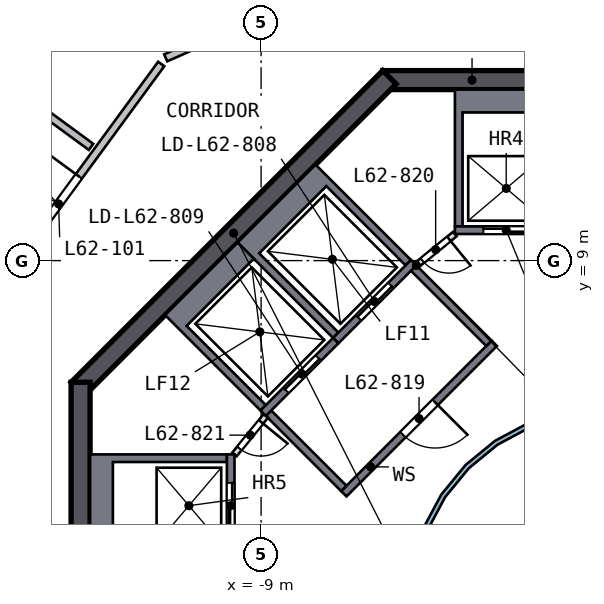
"""IFC4 building model, lengths in metres.
Left out: names, types, materials, properties, quantities, classifications, styles, units other than length and angle.
Written with IfcOpenShell. Run it as: python <this file> out.ifc"""

import sys

from ifc_helpers import new_model, si_unit, direction, frame, frame_2d, origin, place, context, subcontext, project, spatial, polyline, rectangle, outline, extrude, element, fill, save


model = new_model("IFC4")
c1 = context("Model", 3, precision=1e-05, world=origin(), true_north=direction((0.0, 1.0)))
c2 = subcontext(c1, "Body", "Model", "MODEL_VIEW")
j1 = project(units=[si_unit("LENGTHUNIT", "METRE"), si_unit("PLANEANGLEUNIT", "RADIAN")], contexts=[c1])
p1 = place(None, origin())
s1 = spatial("IfcSite", under=j1, at=p1, CompositionType="ELEMENT")
p2 = place(p1, origin())
s2 = spatial("IfcBuilding", under=s1, at=p2, CompositionType="ELEMENT")
p3 = place(p2, frame((0.0, 0.0, 252.5)))
s3 = spatial("IfcBuildingStorey", under=s2, at=p3, CompositionType="ELEMENT", Elevation=252.5)
p4 = place(p3, frame((5.799, 13.75, 0.0), z_axis=(0.0, 0.0, 1.0), x_axis=(-1.0, 0.0, 0.0)))
e1 = element("IfcWall", 1, at=p4, inside=s3, PredefinedType="SHEAR", context=c2, shape_type="SweptSolid", body=[
    extrude(rectangle(XDim=11.598, YDim=0.5, at=frame_2d((5.799, 0.0))), origin(), (0.0, 0.0, 1.0), 3.5),
])
p5 = place(p4, frame((4.899, 0.0, 0.0)))
e2 = element("IfcOpeningElement", 2, at=p5, cuts=e1, PredefinedType="OPENING", context=c2, shape_type="SweptSolid", body=[
    extrude(rectangle(XDim=1.8, YDim=2.1, at=frame_2d((0.9, 1.05))), frame((0.0, 0.26, 0.0), z_axis=(0.0, -1.0, 0.0), x_axis=(1.0, 0.0, 0.0)), (0.0, 0.0, 1.0), 0.52),
])
p6 = place(p3, frame((-5.622, 13.823, 0.0), z_axis=(0.0, 0.0, 1.0), x_axis=(-0.707106781, -0.707106781, 0.0)))
e3 = element("IfcWall", 3, at=p6, inside=s3, PredefinedType="SHEAR", context=c2, shape_type="SweptSolid", body=[
    extrude(rectangle(XDim=11.598, YDim=0.5, at=frame_2d((5.799, 0.0))), origin(), (0.0, 0.0, 1.0), 3.5),
])
p7 = place(p3, frame((-13.75, 5.799, 0.0), z_axis=(0.0, 0.0, 1.0), x_axis=(0.0, -1.0, 0.0)))
e4 = element("IfcWall", 4, at=p7, inside=s3, PredefinedType="SHEAR", context=c2, shape_type="SweptSolid", body=[
    extrude(rectangle(XDim=11.598, YDim=0.5, at=frame_2d((5.799, 0.0))), origin(), (0.0, 0.0, 1.0), 3.5),
])
p8 = place(p7, frame((4.899, 0.0, 0.0)))
e5 = element("IfcOpeningElement", 5, at=p8, cuts=e4, PredefinedType="OPENING", context=c2, shape_type="SweptSolid", body=[
    extrude(rectangle(XDim=1.8, YDim=2.1, at=frame_2d((0.9, 1.05))), frame((0.0, 0.26, 0.0), z_axis=(0.0, -1.0, 0.0), x_axis=(1.0, 0.0, 0.0)), (0.0, 0.0, 1.0), 0.52),
])
p9 = place(p3, origin())
e6 = element("IfcWall", 6, at=p9, inside=s3, PredefinedType="SOLIDWALL", context=c2, shape_type="SweptSolid", body=[
    extrude(outline(polyline([(-3.9, 13.5), (-1.2, 13.5), (-1.2, 9.9), (-1.4, 9.9), (-1.4, 12.9), (-3.7, 12.9), (-3.7, 9.9), (-3.9, 9.9), (-3.9, 13.5)])), origin(), (0.0, 0.0, 1.0), 3.19),
])
p10 = place(p3, frame((-1.2, 9.8, 0.0), z_axis=(0.0, 0.0, 1.0), x_axis=(-1.0, 0.0, 0.0)))
e7 = element("IfcWall", 7, at=p10, inside=s3, PredefinedType="SOLIDWALL", context=c2, shape_type="SweptSolid", body=[
    extrude(rectangle(XDim=2.7, YDim=0.2, at=frame_2d((1.35, 0.0))), origin(), (0.0, 0.0, 1.0), 3.19),
])
p11 = place(p10, frame((0.75, 0.0, 0.0)))
e8 = element("IfcOpeningElement", 8, at=p11, cuts=e7, PredefinedType="OPENING", context=c2, shape_type="SweptSolid", body=[
    extrude(rectangle(XDim=1.2, YDim=2.1, at=frame_2d((0.6, 1.05))), frame((0.0, 0.11, 0.0), z_axis=(0.0, -1.0, 0.0), x_axis=(1.0, 0.0, 0.0)), (0.0, 0.0, 1.0), 0.22),
])
p12 = place(p3, origin())
e9 = element("IfcWall", 9, at=p12, inside=s3, PredefinedType="SOLIDWALL", context=c2, shape_type="SweptSolid", body=[
    extrude(outline(polyline([(-13.5, 3.9), (-9.9, 3.9), (-9.9, 3.7), (-12.9, 3.7), (-12.9, 1.4), (-9.9, 1.4), (-9.9, 1.2), (-13.5, 1.2), (-13.5, 3.9)])), origin(), (0.0, 0.0, 1.0), 3.19),
])
p13 = place(p3, frame((-9.8, 1.2, 0.0), z_axis=(0.0, 0.0, 1.0), x_axis=(0.0, 1.0, 0.0)))
e10 = element("IfcWall", 10, at=p13, inside=s3, PredefinedType="SOLIDWALL", context=c2, shape_type="SweptSolid", body=[
    extrude(rectangle(XDim=2.7, YDim=0.2, at=frame_2d((1.35, 0.0))), origin(), (0.0, 0.0, 1.0), 3.19),
])
p14 = place(p13, frame((0.75, 0.0, 0.0)))
e11 = element("IfcOpeningElement", 11, at=p14, cuts=e10, PredefinedType="OPENING", context=c2, shape_type="SweptSolid", body=[
    extrude(rectangle(XDim=1.2, YDim=2.1, at=frame_2d((0.6, 1.05))), frame((0.0, 0.11, 0.0), z_axis=(0.0, -1.0, 0.0), x_axis=(1.0, 0.0, 0.0)), (0.0, 0.0, 1.0), 0.22),
])
p15 = place(p3, origin())
e12 = element("IfcWall", 12, at=p15, inside=s3, PredefinedType="SOLIDWALL", context=c2, shape_type="SweptSolid", body=[
    extrude(outline(polyline([(-9.617, 9.475), (-7.566, 11.526), (-5.056, 9.016), (-5.197, 8.874), (-7.283, 10.96), (-9.051, 9.192), (-6.965, 7.106), (-7.106, 6.965), (-9.617, 9.475)])), origin(), (0.0, 0.0, 1.0), 3.19),
])
p16 = place(p3, frame((-4.985, 8.945, 0.0), z_axis=(0.0, 0.0, 1.0), x_axis=(-0.707106781, -0.707106781, 0.0)))
e13 = element("IfcWall", 13, at=p16, inside=s3, PredefinedType="SOLIDWALL", context=c2, shape_type="SweptSolid", body=[
    extrude(rectangle(XDim=2.9, YDim=0.2, at=frame_2d((1.45, 0.0))), origin(), (0.0, 0.0, 1.0), 3.19),
])
p17 = place(p16, frame((0.85, 0.0, 0.0)))
e14 = element("IfcOpeningElement", 14, at=p17, cuts=e13, PredefinedType="OPENING", context=c2, shape_type="SweptSolid", body=[
    extrude(rectangle(XDim=1.2, YDim=2.1, at=frame_2d((0.6, 1.05))), frame((0.0, 0.11, 0.0), z_axis=(0.0, -1.0, 0.0), x_axis=(1.0, 0.0, 0.0)), (0.0, 0.0, 1.0), 0.22),
])
p18 = place(p3, origin())
e15 = element("IfcWall", 15, at=p18, inside=s3, PredefinedType="SOLIDWALL", context=c2, shape_type="SweptSolid", body=[
    extrude(outline(polyline([(-11.526, 7.566), (-9.617, 9.475), (-9.192, 9.051), (-10.96, 7.283), (-8.874, 5.197), (-9.016, 5.056), (-11.526, 7.566)])), origin(), (0.0, 0.0, 1.0), 3.19),
])
p19 = place(p3, frame((-7.036, 6.894, 0.0), z_axis=(0.0, 0.0, 1.0), x_axis=(-0.707106781, -0.707106781, 0.0)))
e16 = element("IfcWall", 16, at=p19, inside=s3, PredefinedType="SOLIDWALL", context=c2, shape_type="SweptSolid", body=[
    extrude(rectangle(XDim=2.7, YDim=0.2, at=frame_2d((1.35, 0.0))), origin(), (0.0, 0.0, 1.0), 3.19),
])
p20 = place(p19, frame((0.65, 0.0, 0.0)))
e17 = element("IfcOpeningElement", 17, at=p20, cuts=e16, PredefinedType="OPENING", context=c2, shape_type="SweptSolid", body=[
    extrude(rectangle(XDim=1.2, YDim=2.1, at=frame_2d((0.6, 1.05))), frame((0.0, 0.11, 0.0), z_axis=(0.0, -1.0, 0.0), x_axis=(1.0, 0.0, 0.0)), (0.0, 0.0, 1.0), 0.22),
])
p21 = place(p3, frame((-2.864, 6.823, 0.0), z_axis=(0.0, 0.0, 1.0), x_axis=(-0.707106781, -0.707106781, 0.0)))
e18 = element("IfcWall", 18, at=p21, inside=s3, PredefinedType="SOLIDWALL", context=c2, shape_type="SweptSolid", body=[
    extrude(rectangle(XDim=5.6, YDim=0.2, at=frame_2d((2.8, 0.0))), origin(), (0.0, 0.0, 1.0), 3.19),
])
p22 = place(p21, frame((2.2, 0.0, 0.0)))
e19 = element("IfcOpeningElement", 19, at=p22, cuts=e18, PredefinedType="OPENING", context=c2, shape_type="SweptSolid", body=[
    extrude(rectangle(XDim=1.2, YDim=2.1, at=frame_2d((0.6, 1.05))), frame((0.0, 0.11, 0.0), z_axis=(0.0, -1.0, 0.0), x_axis=(1.0, 0.0, 0.0)), (0.0, 0.0, 1.0), 0.22),
])
for number, where, z_axis, x_axis in (
    (20, (-3.005, 6.823, 0.0), (0.0, 0.0, 1.0), (-0.707, 0.707, 0.0)),
    (21, (-6.823, 3.005, 0.0), (0.0, 0.0, 1.0), (-0.707, 0.707, 0.0)),
):
    element("IfcWall", number, at=place(p3, frame(where, z_axis=z_axis, x_axis=x_axis)), inside=s3, PredefinedType="SOLIDWALL", context=c2, shape_type="SweptSolid", body=[
        extrude(rectangle(XDim=2.8, YDim=0.2, at=frame_2d((1.4, 0.0))), origin(), (0.0, 0.0, 1.0), 3.19),
    ])
p23 = place(p3, frame((-3.9, 9.7, 0.0), z_axis=(0.0, 0.0, 1.0), x_axis=(-0.775559878, -0.631274009, 0.0)))
e22 = element("IfcWall", 22, at=p23, inside=s3, PredefinedType="PARTITIONING", context=c2, shape_type="SweptSolid", body=[
    extrude(rectangle(XDim=1.308, YDim=0.15, at=frame_2d((0.654, 0.0))), origin(), (0.0, 0.0, 1.0), 3.19),
])
p24 = place(p23, frame((0.204, 0.0, 0.0)))
e23 = element("IfcOpeningElement", 23, at=p24, cuts=e22, PredefinedType="OPENING", context=c2, shape_type="SweptSolid", body=[
    extrude(rectangle(XDim=0.9, YDim=2.1, at=frame_2d((0.45, 1.05))), frame((0.0, 0.085, 0.0), z_axis=(0.0, -1.0, 0.0), x_axis=(1.0, 0.0, 0.0)), (0.0, 0.0, 1.0), 0.17),
])
p25 = place(p3, frame((-8.874, 4.914, 0.0), z_axis=(0.0, 0.0, 1.0), x_axis=(-0.631274009, -0.775559878, 0.0)))
e24 = element("IfcWall", 24, at=p25, inside=s3, PredefinedType="PARTITIONING", context=c2, shape_type="SweptSolid", body=[
    extrude(rectangle(XDim=1.308, YDim=0.15, at=frame_2d((0.654, 0.0))), origin(), (0.0, 0.0, 1.0), 3.19),
])
p26 = place(p25, frame((0.204, 0.0, 0.0)))
e25 = element("IfcOpeningElement", 25, at=p26, cuts=e24, PredefinedType="OPENING", context=c2, shape_type="SweptSolid", body=[
    extrude(rectangle(XDim=0.9, YDim=2.1, at=frame_2d((0.45, 1.05))), frame((0.0, 0.085, 0.0), z_axis=(0.0, -1.0, 0.0), x_axis=(1.0, 0.0, 0.0)), (0.0, 0.0, 1.0), 0.17),
])
p27 = place(p3, origin())
e26 = element("IfcWall", 26, at=p27, inside=s3, PredefinedType="SOLIDWALL", context=c2, shape_type="SweptSolid", body=[
    extrude(outline(polyline([(5.021, -0.999), (4.73, -1.959), (4.257, -2.844), (3.62, -3.62), (2.844, -4.257), (1.959, -4.73), (0.999, -5.021), (0.0, -5.12), (-0.999, -5.021), (-1.959, -4.73), (-2.844, -4.257), (-3.62, -3.62), (-4.257, -2.844), (-4.73, -1.959), (-5.021, -0.999), (-5.12, 0.0), (-5.021, 0.999), (-4.73, 1.959), (-4.257, 2.844), (-3.62, 3.62), (-2.844, 4.257), (-1.959, 4.73), (-0.999, 5.021), (0.0, 5.12), (0.999, 5.021), (1.959, 4.73), (2.844, 4.257), (3.62, 3.62), (4.257, 2.844), (4.73, 1.959), (5.021, 0.999), (5.12, 0.0), (5.021, -0.999)]), holes=[polyline([(4.904, 0.976), (4.619, 1.913), (4.157, 2.778), (3.535, 3.535), (2.778, 4.157), (1.913, 4.619), (0.976, 4.904), (0.0, 5.0), (-0.976, 4.904), (-1.913, 4.619), (-2.778, 4.157), (-3.535, 3.535), (-4.157, 2.778), (-4.619, 1.913), (-4.904, 0.976), (-5.0, 0.0), (-4.904, -0.976), (-4.619, -1.913), (-4.157, -2.778), (-3.535, -3.535), (-2.778, -4.157), (-1.913, -4.619), (-0.976, -4.904), (0.0, -5.0), (0.976, -4.904), (1.913, -4.619), (2.778, -4.157), (3.535, -3.535), (4.157, -2.778), (4.619, -1.913), (4.904, -0.976), (5.0, 0.0), (4.904, 0.976)])]), origin(), (0.0, 0.0, 1.0), 3.19),
])
p28 = place(p3, frame((-17.136, 6.66, 0.0), z_axis=(0.0, 0.0, 1.0), x_axis=(0.591171658, 0.806545765, 0.0)))
e27 = element("IfcWall", 27, at=p28, inside=s3, PredefinedType="SOLIDWALL", context=c2, shape_type="SweptSolid", body=[
    extrude(rectangle(XDim=9.317, YDim=0.2, at=frame_2d((4.658, 0.0))), origin(), (0.0, 0.0, 1.0), 3.19),
])
p29 = place(p28, frame((3.85, 0.0, 0.0)))
e28 = element("IfcOpeningElement", 28, at=p29, cuts=e27, PredefinedType="OPENING", context=c2, shape_type="SweptSolid", body=[
    extrude(rectangle(XDim=1.8, YDim=2.1, at=frame_2d((0.9, 1.05))), frame((0.0, 0.11, 0.0), z_axis=(0.0, -1.0, 0.0), x_axis=(1.0, 0.0, 0.0)), (0.0, 0.0, 1.0), 0.22),
])
p30 = place(p3, frame((-2.8, 18.17, 0.0), z_axis=(0.0, 0.0, 1.0), x_axis=(-0.915239358, -0.402910557, 0.0)))
e29 = element("IfcWall", 29, at=p30, inside=s3, PredefinedType="SOLIDWALL", context=c2, shape_type="SweptSolid", body=[
    extrude(rectangle(XDim=9.516, YDim=0.2, at=frame_2d((4.758, 0.0))), origin(), (0.0, 0.0, 1.0), 3.19),
])
p31 = place(p3, frame((-25.756, 20.995, 0.0), z_axis=(0.0, 0.0, 1.0), x_axis=(0.806541585, -0.591177361, 0.0)))
e30 = element("IfcWall", 30, at=p31, inside=s3, PredefinedType="SOLIDWALL", context=c2, shape_type="SweptSolid", body=[
    extrude(rectangle(XDim=15.227, YDim=0.2, at=frame_2d((7.613, 0.0))), origin(), (0.0, 0.0, 1.0), 3.19),
])
p32 = place(p31, frame((4.8, 0.0, 0.0)))
e31 = element("IfcOpeningElement", 31, at=p32, cuts=e30, PredefinedType="OPENING", context=c2, shape_type="SweptSolid", body=[
    extrude(rectangle(XDim=1.0, YDim=2.1, at=frame_2d((0.5, 1.05))), frame((0.0, 0.11, 0.0), z_axis=(0.0, -1.0, 0.0), x_axis=(1.0, 0.0, 0.0)), (0.0, 0.0, 1.0), 0.22),
])
p33 = place(p11, origin())
e32 = element("IfcDoor", 32, at=p33, inside=s3, OperationType="DOUBLE_DOOR_SLIDING", PredefinedType="DOOR", context=c2, shape_type="SweptSolid", body=[
    extrude(rectangle(XDim=1.2, YDim=2.1, at=frame_2d((0.6, 1.05))), frame((0.0, 0.025, 0.0), z_axis=(0.0, -1.0, 0.0), x_axis=(1.0, 0.0, 0.0)), (0.0, 0.0, 1.0), 0.05),
])
fill(e8, e32)
p34 = place(p14, origin())
e33 = element("IfcDoor", 33, at=p34, inside=s3, OperationType="DOUBLE_DOOR_SLIDING", PredefinedType="DOOR", context=c2, shape_type="SweptSolid", body=[
    extrude(rectangle(XDim=1.2, YDim=2.1, at=frame_2d((0.6, 1.05))), frame((0.0, 0.025, 0.0), z_axis=(0.0, -1.0, 0.0), x_axis=(1.0, 0.0, 0.0)), (0.0, 0.0, 1.0), 0.05),
])
fill(e11, e33)
p35 = place(p17, origin())
e34 = element("IfcDoor", 34, at=p35, inside=s3, OperationType="DOUBLE_DOOR_SLIDING", PredefinedType="DOOR", context=c2, shape_type="SweptSolid", body=[
    extrude(rectangle(XDim=1.2, YDim=2.1, at=frame_2d((0.6, 1.05))), frame((0.0, 0.025, 0.0), z_axis=(0.0, -1.0, 0.0), x_axis=(1.0, 0.0, 0.0)), (0.0, 0.0, 1.0), 0.05),
])
fill(e14, e34)
p36 = place(p20, origin())
e35 = element("IfcDoor", 35, at=p36, inside=s3, OperationType="DOUBLE_DOOR_SLIDING", PredefinedType="DOOR", context=c2, shape_type="SweptSolid", body=[
    extrude(rectangle(XDim=1.2, YDim=2.1, at=frame_2d((0.6, 1.05))), frame((0.0, 0.025, 0.0), z_axis=(0.0, -1.0, 0.0), x_axis=(1.0, 0.0, 0.0)), (0.0, 0.0, 1.0), 0.05),
])
fill(e17, e35)
p37 = place(p22, origin())
e36 = element("IfcDoor", 36, at=p37, inside=s3, OperationType="SINGLE_SWING_LEFT", PredefinedType="DOOR", context=c2, shape_type="SweptSolid", body=[
    extrude(rectangle(XDim=1.2, YDim=2.1, at=frame_2d((0.6, 1.05))), frame((0.0, 0.025, 0.0), z_axis=(0.0, -1.0, 0.0), x_axis=(1.0, 0.0, 0.0)), (0.0, 0.0, 1.0), 0.05),
])
fill(e19, e36)
p38 = place(p24, origin())
e37 = element("IfcDoor", 37, at=p38, inside=s3, OperationType="SINGLE_SWING_LEFT", PredefinedType="DOOR", context=c2, shape_type="SweptSolid", body=[
    extrude(rectangle(XDim=0.9, YDim=2.1, at=frame_2d((0.45, 1.05))), frame((0.0, 0.025, 0.0), z_axis=(0.0, -1.0, 0.0), x_axis=(1.0, 0.0, 0.0)), (0.0, 0.0, 1.0), 0.05),
])
fill(e23, e37)
p39 = place(p26, origin())
e38 = element("IfcDoor", 38, at=p39, inside=s3, OperationType="SINGLE_SWING_LEFT", PredefinedType="DOOR", context=c2, shape_type="SweptSolid", body=[
    extrude(rectangle(XDim=0.9, YDim=2.1, at=frame_2d((0.45, 1.05))), frame((0.0, 0.025, 0.0), z_axis=(0.0, -1.0, 0.0), x_axis=(1.0, 0.0, 0.0)), (0.0, 0.0, 1.0), 0.05),
])
fill(e25, e38)
p40 = place(p29, origin())
e39 = element("IfcDoor", 39, at=p40, inside=s3, OperationType="DOUBLE_DOOR_SINGLE_SWING", PredefinedType="DOOR", context=c2, shape_type="SweptSolid", body=[
    extrude(rectangle(XDim=1.8, YDim=2.1, at=frame_2d((0.9, 1.05))), frame((0.0, 0.025, 0.0), z_axis=(0.0, -1.0, 0.0), x_axis=(1.0, 0.0, 0.0)), (0.0, 0.0, 1.0), 0.05),
])
fill(e28, e39)
save(model, sys.argv[1])
